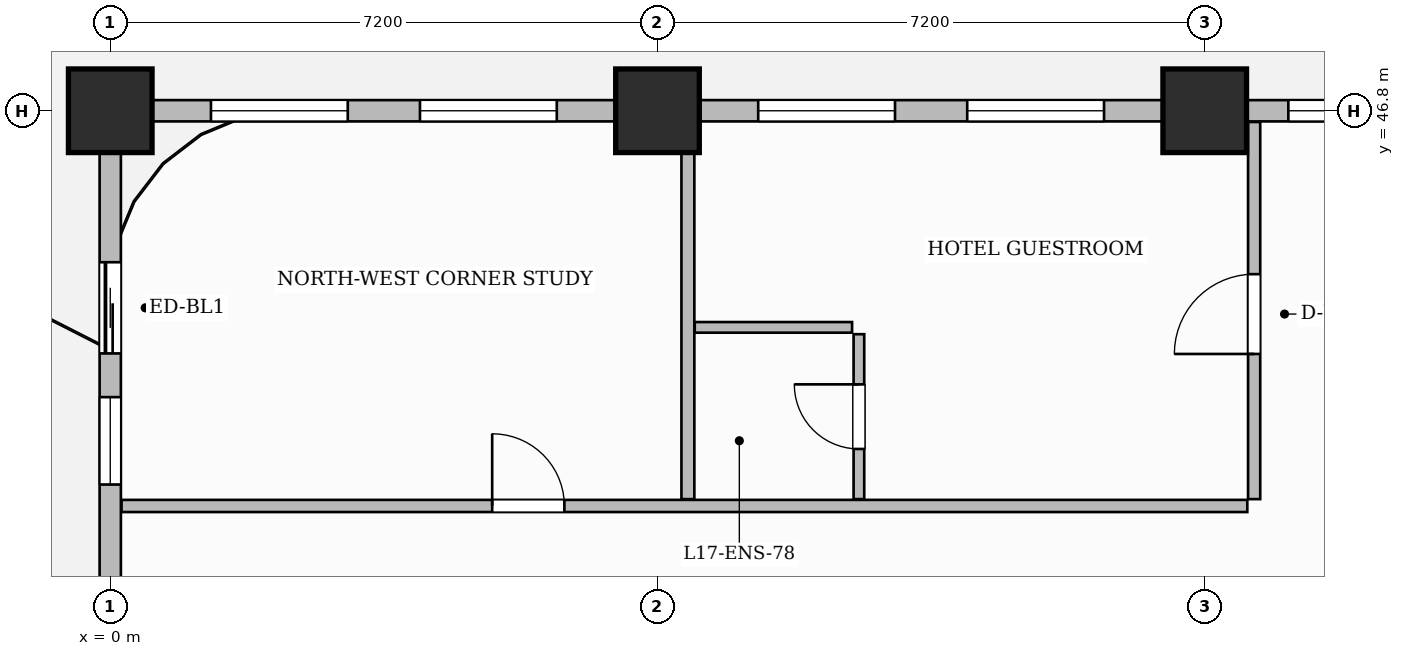
"""IFC4 building model, lengths in metres.
Left out: names, types, materials, properties, quantities, classifications, styles, units other than length and angle.
Written with IfcOpenShell. Run it as: python <this file> out.ifc"""

import sys

from ifc_helpers import new_model, si_unit, direction, frame, frame_2d, origin, origin_2d, place, context, subcontext, project, spatial, rectangle, extrude, source, transform, mapped, element, fill, save


model = new_model("IFC4")
c1 = context("Model", 3, precision=1e-05, world=origin(), true_north=direction((0.0, 1.0)))
c2 = subcontext(c1, "Body", "Model", "MODEL_VIEW")
j1 = project(units=[si_unit("LENGTHUNIT", "METRE"), si_unit("PLANEANGLEUNIT", "RADIAN")], contexts=[c1])
p1 = place(None, origin())
s1 = spatial("IfcSite", under=j1, at=p1, CompositionType="ELEMENT")
p2 = place(p1, origin())
s2 = spatial("IfcBuilding", under=s1, at=p2, CompositionType="ELEMENT")
p3 = place(p2, frame((0.0, 0.0, 73.1)))
s3 = spatial("IfcBuildingStorey", under=s2, at=p3, CompositionType="ELEMENT", Elevation=73.1)
m1 = source(origin(), c2, "Body", "SweptSolid", [
    extrude(rectangle(XDim=1.1, YDim=1.1, at=origin_2d()), origin(), (0.0, 0.0, 1.0), 3.7),
])
for number, where, z_axis, x_axis in (
    (1, (0.0, 46.8, 0.0), (0.0, 0.0, 1.0), (1.0, 0.0, 0.0)),
    (2, (7.2, 46.8, 0.0), (0.0, 0.0, 1.0), (1.0, 0.0, 0.0)),
    (3, (14.4, 46.8, 0.0), (0.0, 0.0, 1.0), (1.0, 0.0, 0.0)),
):
    element("IfcColumn", number, at=place(p3, frame(where, z_axis=z_axis, x_axis=x_axis)), inside=s3, PredefinedType="COLUMN", context=c2, shape_type="MappedRepresentation", body=[
        mapped(m1, transform((0.0, 0.0, 0.0), scale=1.0)),
    ])
p4 = place(p3, frame((15.05, 41.69, 0.0), z_axis=(0.0, 0.0, 1.0), x_axis=(0.0, 1.0, 0.0)))
e4 = element("IfcWall", 4, at=p4, inside=s3, PredefinedType="PARTITIONING", context=c2, shape_type="SweptSolid", body=[
    extrude(rectangle(XDim=4.962, YDim=0.16, at=frame_2d((2.481, 0.0))), origin(), (0.0, 0.0, 1.0), 3.45),
])
p5 = place(p4, frame((1.91, 0.0, 0.0)))
e5 = element("IfcOpeningElement", 5, at=p5, cuts=e4, PredefinedType="OPENING", context=c2, shape_type="SweptSolid", body=[
    extrude(rectangle(XDim=1.05, YDim=2.25, at=frame_2d((0.525, 1.125))), frame((0.0, 0.09, 0.0), z_axis=(0.0, -1.0, 0.0), x_axis=(1.0, 0.0, 0.0)), (0.0, 0.0, 1.0), 0.18),
])
p6 = place(p3, frame((7.6, 41.69, 0.0), z_axis=(0.0, 0.0, 1.0), x_axis=(0.0, 1.0, 0.0)))
e6 = element("IfcWall", 6, at=p6, inside=s3, PredefinedType="PARTITIONING", context=c2, shape_type="SweptSolid", body=[
    extrude(rectangle(XDim=4.87, YDim=0.17, at=frame_2d((2.435, 0.0))), origin(), (0.0, 0.0, 1.0), 3.45),
])
p7 = place(p3, frame((0.148, 41.6, 0.0), z_axis=(0.0, 0.0, 1.0), x_axis=(1.0, 0.0, 0.0)))
e7 = element("IfcWall", 7, at=p7, inside=s3, PredefinedType="PARTITIONING", context=c2, shape_type="SweptSolid", body=[
    extrude(rectangle(XDim=14.812, YDim=0.16, at=frame_2d((7.406, 0.0))), origin(), (0.0, 0.0, 1.0), 2.885),
])
p8 = place(p7, frame((4.877, 0.0, 0.0)))
e8 = element("IfcOpeningElement", 8, at=p8, cuts=e7, PredefinedType="OPENING", context=c2, shape_type="SweptSolid", body=[
    extrude(rectangle(XDim=0.95, YDim=2.15, at=frame_2d((0.475, 1.075))), frame((0.0, 0.09, 0.0), z_axis=(0.0, -1.0, 0.0), x_axis=(1.0, 0.0, 0.0)), (0.0, 0.0, 1.0), 0.18),
])
p9 = place(p3, frame((7.69, 43.95, 0.0), z_axis=(0.0, 0.0, 1.0), x_axis=(1.0, 0.0, 0.0)))
e9 = element("IfcWall", 9, at=p9, inside=s3, PredefinedType="PARTITIONING", context=c2, shape_type="SweptSolid", body=[
    extrude(rectangle(XDim=2.07, YDim=0.14, at=frame_2d((1.035, 0.0))), origin(), (0.0, 0.0, 1.0), 2.885),
])
p10 = place(p3, frame((9.85, 41.69, 0.0), z_axis=(0.0, 0.0, 1.0), x_axis=(0.0, 1.0, 0.0)))
e10 = element("IfcWall", 10, at=p10, inside=s3, PredefinedType="PARTITIONING", context=c2, shape_type="SweptSolid", body=[
    extrude(rectangle(XDim=2.17, YDim=0.14, at=frame_2d((1.085, 0.0))), origin(), (0.0, 0.0, 1.0), 3.45),
])
p11 = place(p10, frame((0.66, 0.0, 0.0)))
e11 = element("IfcOpeningElement", 11, at=p11, cuts=e10, PredefinedType="OPENING", context=c2, shape_type="SweptSolid", body=[
    extrude(rectangle(XDim=0.85, YDim=2.1, at=frame_2d((0.425, 1.05))), frame((0.0, 0.08, 0.0), z_axis=(0.0, -1.0, 0.0), x_axis=(1.0, 0.0, 0.0)), (0.0, 0.0, 1.0), 0.16),
])
p12 = place(p3, frame((0.0, 25.25, 0.0), z_axis=(0.0, 0.0, 1.0), x_axis=(0.0, 1.0, 0.0)))
e12 = element("IfcWall", 12, at=p12, inside=s3, PredefinedType="SOLIDWALL", context=c2, shape_type="SweptSolid", body=[
    extrude(rectangle(XDim=21.5, YDim=0.28, at=frame_2d((10.75, 0.0))), origin(), (0.0, 0.0, 1.0), 2.885),
])
p13 = place(p12, frame((18.357, 0.0, 0.0)))
e13 = element("IfcOpeningElement", 13, at=p13, cuts=e12, PredefinedType="OPENING", context=c2, shape_type="SweptSolid", body=[
    extrude(rectangle(XDim=1.2, YDim=2.2, at=frame_2d((0.6, 1.1))), frame((0.0, 0.15, 0.0), z_axis=(0.0, -1.0, 0.0), x_axis=(1.0, 0.0, 0.0)), (0.0, 0.0, 1.0), 0.3),
])
p14 = place(p12, frame((0.8, 0.0, 0.0)))
e14 = element("IfcOpeningElement", 14, at=p14, cuts=e12, PredefinedType="OPENING", context=c2, shape_type="SweptSolid", body=[
    extrude(rectangle(XDim=1.2, YDim=2.2, at=frame_2d((0.6, 1.1))), frame((0.0, 0.15, 0.0), z_axis=(0.0, -1.0, 0.0), x_axis=(1.0, 0.0, 0.0)), (0.0, 0.0, 1.0), 0.3),
])
p15 = place(p12, frame((3.425, 0.0, 0.8)))
e15 = element("IfcOpeningElement", 15, at=p15, cuts=e12, PredefinedType="OPENING", context=c2, shape_type="SweptSolid", body=[
    extrude(rectangle(XDim=1.8, YDim=1.85, at=frame_2d((0.9, 0.925))), frame((0.0, 0.15, 0.0), z_axis=(0.0, -1.0, 0.0), x_axis=(1.0, 0.0, 0.0)), (0.0, 0.0, 1.0), 0.3),
])
p16 = place(p12, frame((8.475, 0.0, 0.8)))
e16 = element("IfcOpeningElement", 16, at=p16, cuts=e12, PredefinedType="OPENING", context=c2, shape_type="SweptSolid", body=[
    extrude(rectangle(XDim=1.8, YDim=1.85, at=frame_2d((0.9, 0.925))), frame((0.0, 0.15, 0.0), z_axis=(0.0, -1.0, 0.0), x_axis=(1.0, 0.0, 0.0)), (0.0, 0.0, 1.0), 0.3),
])
p17 = place(p12, frame((11.225, 0.0, 0.8)))
e17 = element("IfcOpeningElement", 17, at=p17, cuts=e12, PredefinedType="OPENING", context=c2, shape_type="SweptSolid", body=[
    extrude(rectangle(XDim=1.8, YDim=1.85, at=frame_2d((0.9, 0.925))), frame((0.0, 0.15, 0.0), z_axis=(0.0, -1.0, 0.0), x_axis=(1.0, 0.0, 0.0)), (0.0, 0.0, 1.0), 0.3),
])
p18 = place(p12, frame((16.632, 0.0, 0.8)))
e18 = element("IfcOpeningElement", 18, at=p18, cuts=e12, PredefinedType="OPENING", context=c2, shape_type="SweptSolid", body=[
    extrude(rectangle(XDim=1.15, YDim=1.8, at=frame_2d((0.575, 0.9))), frame((0.0, 0.15, 0.0), z_axis=(0.0, -1.0, 0.0), x_axis=(1.0, 0.0, 0.0)), (0.0, 0.0, 1.0), 0.3),
])
p19 = place(p3, frame((0.0, 46.8, 0.0), z_axis=(0.0, 0.0, 1.0), x_axis=(1.0, 0.0, 0.0)))
e19 = element("IfcWall", 19, at=p19, inside=s3, PredefinedType="SOLIDWALL", context=c2, shape_type="SweptSolid", body=[
    extrude(rectangle(XDim=18.0, YDim=0.28, at=frame_2d((9.0, 0.0))), origin(), (0.0, 0.0, 1.0), 2.885),
])
p20 = place(p19, frame((1.325, 0.0, 0.8)))
e20 = element("IfcOpeningElement", 20, at=p20, cuts=e19, PredefinedType="OPENING", context=c2, shape_type="SweptSolid", body=[
    extrude(rectangle(XDim=1.8, YDim=1.85, at=frame_2d((0.9, 0.925))), frame((0.0, 0.15, 0.0), z_axis=(0.0, -1.0, 0.0), x_axis=(1.0, 0.0, 0.0)), (0.0, 0.0, 1.0), 0.3),
])
p21 = place(p19, frame((4.075, 0.0, 0.8)))
e21 = element("IfcOpeningElement", 21, at=p21, cuts=e19, PredefinedType="OPENING", context=c2, shape_type="SweptSolid", body=[
    extrude(rectangle(XDim=1.8, YDim=1.85, at=frame_2d((0.9, 0.925))), frame((0.0, 0.15, 0.0), z_axis=(0.0, -1.0, 0.0), x_axis=(1.0, 0.0, 0.0)), (0.0, 0.0, 1.0), 0.3),
])
p22 = place(p19, frame((8.525, 0.0, 0.8)))
e22 = element("IfcOpeningElement", 22, at=p22, cuts=e19, PredefinedType="OPENING", context=c2, shape_type="SweptSolid", body=[
    extrude(rectangle(XDim=1.8, YDim=1.85, at=frame_2d((0.9, 0.925))), frame((0.0, 0.15, 0.0), z_axis=(0.0, -1.0, 0.0), x_axis=(1.0, 0.0, 0.0)), (0.0, 0.0, 1.0), 0.3),
])
p23 = place(p19, frame((11.275, 0.0, 0.8)))
e23 = element("IfcOpeningElement", 23, at=p23, cuts=e19, PredefinedType="OPENING", context=c2, shape_type="SweptSolid", body=[
    extrude(rectangle(XDim=1.8, YDim=1.85, at=frame_2d((0.9, 0.925))), frame((0.0, 0.15, 0.0), z_axis=(0.0, -1.0, 0.0), x_axis=(1.0, 0.0, 0.0)), (0.0, 0.0, 1.0), 0.3),
])
p24 = place(p19, frame((15.5, 0.0, 0.8)))
e24 = element("IfcOpeningElement", 24, at=p24, cuts=e19, PredefinedType="OPENING", context=c2, shape_type="SweptSolid", body=[
    extrude(rectangle(XDim=1.4, YDim=1.85, at=frame_2d((0.7, 0.925))), frame((0.0, 0.15, 0.0), z_axis=(0.0, -1.0, 0.0), x_axis=(1.0, 0.0, 0.0)), (0.0, 0.0, 1.0), 0.3),
])
m2 = source(origin(), c2, "Body", "SweptSolid", [
    extrude(rectangle(XDim=0.95, YDim=2.15, at=frame_2d((0.475, 1.075))), frame((0.0, 0.025, 0.0), z_axis=(0.0, -1.0, 0.0), x_axis=(1.0, 0.0, 0.0)), (0.0, 0.0, 1.0), 0.05),
])
p25 = place(p8, origin())
e25 = element("IfcDoor", 25, at=p25, inside=s3, OperationType="SINGLE_SWING_LEFT", PredefinedType="DOOR", context=c2, shape_type="MappedRepresentation", body=[
    mapped(m2, transform((0.0, 0.0, 0.0), scale=1.0)),
])
fill(e8, e25)
m3 = source(origin(), c2, "Body", "SweptSolid", [
    extrude(rectangle(XDim=0.85, YDim=2.1, at=frame_2d((0.425, 1.05))), frame((0.0, 0.025, 0.0), z_axis=(0.0, -1.0, 0.0), x_axis=(1.0, 0.0, 0.0)), (0.0, 0.0, 1.0), 0.05),
])
p26 = place(p11, origin())
e26 = element("IfcDoor", 26, at=p26, inside=s3, OperationType="SINGLE_SWING_RIGHT", PredefinedType="DOOR", context=c2, shape_type="MappedRepresentation", body=[
    mapped(m3, transform((0.0, 0.0, 0.0), scale=1.0)),
])
fill(e11, e26)
m4 = source(origin(), c2, "Body", "SweptSolid", [
    extrude(rectangle(XDim=1.05, YDim=2.25, at=frame_2d((0.525, 1.125))), frame((0.0, 0.025, 0.0), z_axis=(0.0, -1.0, 0.0), x_axis=(1.0, 0.0, 0.0)), (0.0, 0.0, 1.0), 0.05),
])
p27 = place(p5, origin())
e27 = element("IfcDoor", 27, at=p27, inside=s3, OperationType="SINGLE_SWING_LEFT", PredefinedType="DOOR", context=c2, shape_type="MappedRepresentation", body=[
    mapped(m4, transform((0.0, 0.0, 0.0), scale=1.0)),
])
fill(e5, e27)
m5 = source(origin(), c2, "Body", "SweptSolid", [
    extrude(rectangle(XDim=1.2, YDim=2.2, at=frame_2d((0.6, 1.1))), frame((0.0, 0.025, 0.0), z_axis=(0.0, -1.0, 0.0), x_axis=(1.0, 0.0, 0.0)), (0.0, 0.0, 1.0), 0.05),
])
p28 = place(p13, origin())
e28 = element("IfcDoor", 28, at=p28, inside=s3, OperationType="SLIDING_TO_LEFT", PredefinedType="DOOR", context=c2, shape_type="MappedRepresentation", body=[
    mapped(m5, transform((0.0, 0.0, 0.0), scale=1.0)),
])
fill(e13, e28)
m6 = source(origin(), c2, "Body", "SweptSolid", [
    extrude(rectangle(XDim=1.15, YDim=1.8, at=frame_2d((0.575, 0.9))), frame((0.0, 0.03, 0.0), z_axis=(0.0, -1.0, 0.0), x_axis=(1.0, 0.0, 0.0)), (0.0, 0.0, 1.0), 0.06),
])
p29 = place(p18, origin())
e29 = element("IfcWindow", 29, at=p29, inside=s3, PartitioningType="SINGLE_PANEL", PredefinedType="WINDOW", context=c2, shape_type="MappedRepresentation", body=[
    mapped(m6, transform((0.0, 0.0, 0.0), scale=1.0)),
])
fill(e18, e29)
m7 = source(origin(), c2, "Body", "SweptSolid", [
    extrude(rectangle(XDim=1.8, YDim=1.85, at=frame_2d((0.9, 0.925))), frame((0.0, 0.03, 0.0), z_axis=(0.0, -1.0, 0.0), x_axis=(1.0, 0.0, 0.0)), (0.0, 0.0, 1.0), 0.06),
])
p30 = place(p20, origin())
e30 = element("IfcWindow", 30, at=p30, inside=s3, PartitioningType="DOUBLE_PANEL_VERTICAL", PredefinedType="WINDOW", context=c2, shape_type="MappedRepresentation", body=[
    mapped(m7, transform((0.0, 0.0, 0.0), scale=1.0)),
])
fill(e20, e30)
p31 = place(p21, origin())
e31 = element("IfcWindow", 31, at=p31, inside=s3, PartitioningType="DOUBLE_PANEL_VERTICAL", PredefinedType="WINDOW", context=c2, shape_type="MappedRepresentation", body=[
    mapped(m7, transform((0.0, 0.0, 0.0), scale=1.0)),
])
fill(e21, e31)
p32 = place(p22, origin())
e32 = element("IfcWindow", 32, at=p32, inside=s3, PartitioningType="DOUBLE_PANEL_VERTICAL", PredefinedType="WINDOW", context=c2, shape_type="MappedRepresentation", body=[
    mapped(m7, transform((0.0, 0.0, 0.0), scale=1.0)),
])
fill(e22, e32)
p33 = place(p23, origin())
e33 = element("IfcWindow", 33, at=p33, inside=s3, PartitioningType="DOUBLE_PANEL_VERTICAL", PredefinedType="WINDOW", context=c2, shape_type="MappedRepresentation", body=[
    mapped(m7, transform((0.0, 0.0, 0.0), scale=1.0)),
])
fill(e23, e33)
m8 = source(origin(), c2, "Body", "SweptSolid", [
    extrude(rectangle(XDim=1.4, YDim=1.85, at=frame_2d((0.7, 0.925))), frame((0.0, 0.03, 0.0), z_axis=(0.0, -1.0, 0.0), x_axis=(1.0, 0.0, 0.0)), (0.0, 0.0, 1.0), 0.06),
])
p34 = place(p24, origin())
e34 = element("IfcWindow", 34, at=p34, inside=s3, PartitioningType="SINGLE_PANEL", PredefinedType="WINDOW", context=c2, shape_type="MappedRepresentation", body=[
    mapped(m8, transform((0.0, 0.0, 0.0), scale=1.0)),
])
fill(e24, e34)
save(model, sys.argv[1])
